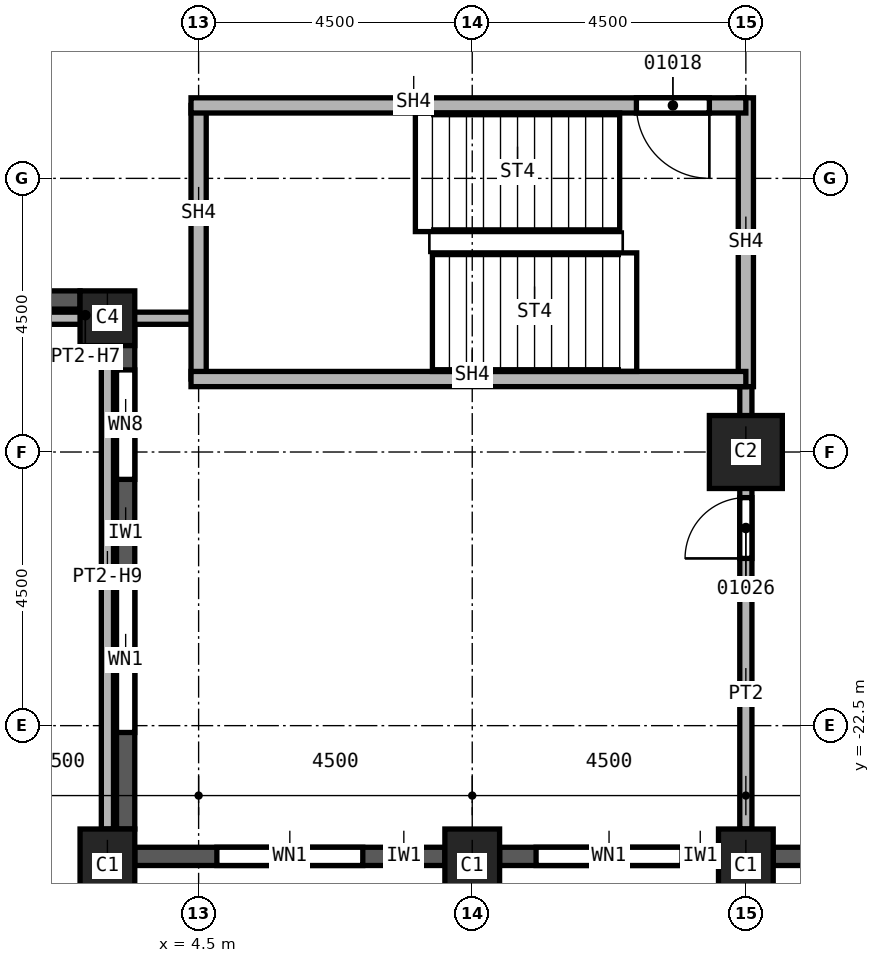
"""IFC4 building model, lengths in metres.
Left out: names, types, materials, properties, quantities, classifications, styles, units other than length and angle.
Written with IfcOpenShell. Run it as: python <this file> out.ifc"""

import sys

from ifc_helpers import new_model, si_unit, direction, frame, frame_2d, origin, origin_2d, place, context, subcontext, project, spatial, rectangle, extrude, element, fill, save


model = new_model("IFC4")
c1 = context("Model", 3, precision=1e-05, world=origin(), true_north=direction((0.0, 1.0)))
c2 = subcontext(c1, "Body", "Model", "MODEL_VIEW")
j1 = project(units=[si_unit("LENGTHUNIT", "METRE"), si_unit("PLANEANGLEUNIT", "RADIAN")], contexts=[c1])
p1 = place(None, origin())
s1 = spatial("IfcSite", under=j1, at=p1, CompositionType="ELEMENT")
p2 = place(p1, origin())
s2 = spatial("IfcBuilding", under=s1, at=p2, CompositionType="ELEMENT")
p3 = place(p2, frame((0.0, 0.0, 68.0)))
s3 = spatial("IfcBuildingStorey", under=s2, at=p3, CompositionType="ELEMENT", Elevation=68.0)
p4 = place(p3, frame((13.5, -18.0, 0.0), z_axis=(0.0, 0.0, 1.0), x_axis=(1.0, 0.0, 0.0)))
e1 = element("IfcColumn", 1, at=p4, inside=s3, PredefinedType="COLUMN", context=c2, shape_type="SweptSolid", body=[
    extrude(rectangle(XDim=1.2, YDim=1.2, at=origin_2d()), origin(), (0.0, 0.0, 1.0), 3.7),
])
for number, where, z_axis, x_axis in (
    (2, (3.0, -24.8, 0.0), (0.0, 0.0, 1.0), (1.0, 0.0, 0.0)),
    (3, (9.0, -24.8, 0.0), (0.0, 0.0, 1.0), (1.0, 0.0, 0.0)),
    (4, (13.5, -24.8, 0.0), (0.0, 0.0, 1.0), (1.0, 0.0, 0.0)),
):
    element("IfcColumn", number, at=place(p3, frame(where, z_axis=z_axis, x_axis=x_axis)), inside=s3, PredefinedType="COLUMN", context=c2, shape_type="SweptSolid", body=[
        extrude(rectangle(XDim=0.9, YDim=1.2, at=origin_2d()), origin(), (0.0, 0.0, 1.0), 3.7),
    ])
p5 = place(p3, frame((3.0, -15.8, 0.0), z_axis=(0.0, 0.0, 1.0), x_axis=(1.0, 0.0, 0.0)))
e5 = element("IfcColumn", 5, at=p5, inside=s3, PredefinedType="COLUMN", context=c2, shape_type="SweptSolid", body=[
    extrude(rectangle(XDim=0.9, YDim=0.9, at=origin_2d()), origin(), (0.0, 0.0, 1.0), 3.7),
])
p6 = place(p3, frame((2.55, -15.5, 0.0), z_axis=(0.0, 0.0, 1.0), x_axis=(-1.0, 0.0, 0.0)))
e6 = element("IfcWall", 6, at=p6, inside=s3, PredefinedType="SOLIDWALL", context=c2, shape_type="SweptSolid", body=[
    extrude(rectangle(XDim=5.1, YDim=0.3, at=frame_2d((2.55, 0.0))), origin(), (0.0, 0.0, 1.0), 3.1),
])
p7 = place(p6, frame((1.95, 0.0, 0.0)))
e7 = element("IfcOpeningElement", 7, at=p7, cuts=e6, PredefinedType="OPENING", context=c2, shape_type="SweptSolid", body=[
    extrude(rectangle(XDim=1.2, YDim=2.4, at=frame_2d((0.6, 1.2))), frame((0.0, 0.15, 0.0), z_axis=(0.0, -1.0, 0.0), x_axis=(1.0, 0.0, 0.0)), (0.0, 0.0, 1.0), 0.3),
])
p8 = place(p3, frame((3.3, -15.85, 0.0), z_axis=(0.0, 0.0, 1.0), x_axis=(0.0, -1.0, 0.0)))
e8 = element("IfcWall", 8, at=p8, inside=s3, PredefinedType="SOLIDWALL", context=c2, shape_type="SweptSolid", body=[
    extrude(rectangle(XDim=8.35, YDim=0.3, at=frame_2d((4.175, 0.0))), origin(), (0.0, 0.0, 1.0), 3.1),
])
p9 = place(p8, frame((4.363, 0.0, 0.8)))
e9 = element("IfcOpeningElement", 9, at=p9, cuts=e8, PredefinedType="OPENING", context=c2, shape_type="SweptSolid", body=[
    extrude(rectangle(XDim=2.4, YDim=1.95, at=frame_2d((1.2, 0.975))), frame((0.0, 0.15, 0.0), z_axis=(0.0, -1.0, 0.0), x_axis=(1.0, 0.0, 0.0)), (0.0, 0.0, 1.0), 0.3),
])
p10 = place(p8, frame((0.8, 0.0, 0.8)))
e10 = element("IfcOpeningElement", 10, at=p10, cuts=e8, PredefinedType="OPENING", context=c2, shape_type="SweptSolid", body=[
    extrude(rectangle(XDim=1.8, YDim=1.95, at=frame_2d((0.9, 0.975))), frame((0.0, 0.15, 0.0), z_axis=(0.0, -1.0, 0.0), x_axis=(1.0, 0.0, 0.0)), (0.0, 0.0, 1.0), 0.3),
])
p11 = place(p3, frame((3.45, -24.65, 0.0), z_axis=(0.0, 0.0, 1.0), x_axis=(1.0, 0.0, 0.0)))
e11 = element("IfcWall", 11, at=p11, inside=s3, PredefinedType="SOLIDWALL", context=c2, shape_type="SweptSolid", body=[
    extrude(rectangle(XDim=5.1, YDim=0.3, at=frame_2d((2.55, 0.0))), origin(), (0.0, 0.0, 1.0), 3.1),
])
p12 = place(p11, frame((1.35, 0.0, 0.8)))
e12 = element("IfcOpeningElement", 12, at=p12, cuts=e11, PredefinedType="OPENING", context=c2, shape_type="SweptSolid", body=[
    extrude(rectangle(XDim=2.4, YDim=1.95, at=frame_2d((1.2, 0.975))), frame((0.0, 0.15, 0.0), z_axis=(0.0, -1.0, 0.0), x_axis=(1.0, 0.0, 0.0)), (0.0, 0.0, 1.0), 0.3),
])
p13 = place(p3, frame((9.45, -24.65, 0.0), z_axis=(0.0, 0.0, 1.0), x_axis=(1.0, 0.0, 0.0)))
e13 = element("IfcWall", 13, at=p13, inside=s3, PredefinedType="SOLIDWALL", context=c2, shape_type="SweptSolid", body=[
    extrude(rectangle(XDim=3.6, YDim=0.3, at=frame_2d((1.8, 0.0))), origin(), (0.0, 0.0, 1.0), 3.1),
])
p14 = place(p13, frame((0.6, 0.0, 0.8)))
e14 = element("IfcOpeningElement", 14, at=p14, cuts=e13, PredefinedType="OPENING", context=c2, shape_type="SweptSolid", body=[
    extrude(rectangle(XDim=2.4, YDim=1.95, at=frame_2d((1.2, 0.975))), frame((0.0, 0.15, 0.0), z_axis=(0.0, -1.0, 0.0), x_axis=(1.0, 0.0, 0.0)), (0.0, 0.0, 1.0), 0.3),
])
p15 = place(p3, frame((13.95, -24.65, 0.0), z_axis=(0.0, 0.0, 1.0), x_axis=(1.0, 0.0, 0.0)))
e15 = element("IfcWall", 15, at=p15, inside=s3, PredefinedType="SOLIDWALL", context=c2, shape_type="SweptSolid", body=[
    extrude(rectangle(XDim=3.6, YDim=0.3, at=frame_2d((1.8, 0.0))), origin(), (0.0, 0.0, 1.0), 3.1),
])
p16 = place(p15, frame((0.625, 0.0, 0.8)))
e16 = element("IfcOpeningElement", 16, at=p16, cuts=e15, PredefinedType="OPENING", context=c2, shape_type="SweptSolid", body=[
    extrude(rectangle(XDim=0.6, YDim=1.95, at=frame_2d((0.3, 0.975))), frame((0.0, 0.15, 0.0), z_axis=(0.0, -1.0, 0.0), x_axis=(1.0, 0.0, 0.0)), (0.0, 0.0, 1.0), 0.3),
])
p17 = place(p15, frame((1.825, 0.0, 0.8)))
e17 = element("IfcOpeningElement", 17, at=p17, cuts=e15, PredefinedType="OPENING", context=c2, shape_type="SweptSolid", body=[
    extrude(rectangle(XDim=1.0, YDim=1.95, at=frame_2d((0.5, 0.975))), frame((0.0, 0.15, 0.0), z_axis=(0.0, -1.0, 0.0), x_axis=(1.0, 0.0, 0.0)), (0.0, 0.0, 1.0), 0.3),
])
p18 = place(p3, frame((3.0, -15.8, 0.0), z_axis=(0.0, 0.0, 1.0), x_axis=(0.0, -1.0, 0.0)))
e18 = element("IfcWall", 18, at=p18, inside=s3, PredefinedType="PARTITIONING", context=c2, shape_type="SweptSolid", body=[
    extrude(rectangle(XDim=8.4, YDim=0.2, at=frame_2d((4.2, 0.0))), origin(), (0.0, 0.0, 1.0), 2.854),
])
p19 = place(p3, frame((4.5, -15.8, 0.0), z_axis=(0.0, 0.0, 1.0), x_axis=(-1.0, 0.0, 0.0)))
e19 = element("IfcWall", 19, at=p19, inside=s3, PredefinedType="PARTITIONING", context=c2, shape_type="SweptSolid", body=[
    extrude(rectangle(XDim=3.6, YDim=0.2, at=frame_2d((1.8, 0.0))), origin(), (0.0, 0.0, 1.0), 3.083),
])
p20 = place(p3, frame((13.5, -24.2, 0.0), z_axis=(0.0, 0.0, 1.0), x_axis=(0.0, 1.0, 0.0)))
e20 = element("IfcWall", 20, at=p20, inside=s3, PredefinedType="PARTITIONING", context=c2, shape_type="SweptSolid", body=[
    extrude(rectangle(XDim=7.525, YDim=0.2, at=frame_2d((3.762, 0.0))), origin(), (0.0, 0.0, 1.0), 3.7),
])
p21 = place(p20, frame((4.45, 0.0, 0.0)))
e21 = element("IfcOpeningElement", 21, at=p21, cuts=e20, PredefinedType="OPENING", context=c2, shape_type="SweptSolid", body=[
    extrude(rectangle(XDim=1.0, YDim=2.1, at=frame_2d((0.5, 1.05))), frame((0.0, 0.1, 0.0), z_axis=(0.0, -1.0, 0.0), x_axis=(1.0, 0.0, 0.0)), (0.0, 0.0, 1.0), 0.2),
])
p22 = place(p3, frame((4.5, -16.8, 0.0), z_axis=(0.0, 0.0, 1.0), x_axis=(0.0, 1.0, 0.0)))
e22 = element("IfcWall", 22, at=p22, inside=s3, PredefinedType="SOLIDWALL", context=c2, shape_type="SweptSolid", body=[
    extrude(rectangle(XDim=4.5, YDim=0.25, at=frame_2d((2.25, 0.0))), origin(), (0.0, 0.0, 1.0), 3.7),
])
p23 = place(p3, frame((13.5, -16.925, 0.0), z_axis=(0.0, 0.0, 1.0), x_axis=(0.0, 1.0, 0.0)))
e23 = element("IfcWall", 23, at=p23, inside=s3, PredefinedType="SOLIDWALL", context=c2, shape_type="SweptSolid", body=[
    extrude(rectangle(XDim=4.75, YDim=0.25, at=frame_2d((2.375, 0.0))), origin(), (0.0, 0.0, 1.0), 3.7),
])
p24 = place(p3, frame((13.5, -16.8, 0.0), z_axis=(0.0, 0.0, 1.0), x_axis=(-1.0, 0.0, 0.0)))
e24 = element("IfcWall", 24, at=p24, inside=s3, PredefinedType="SOLIDWALL", context=c2, shape_type="SweptSolid", body=[
    extrude(rectangle(XDim=9.125, YDim=0.25, at=frame_2d((4.562, 0.0))), origin(), (0.0, 0.0, 1.0), 3.7),
])
p25 = place(p3, frame((13.5, -12.3, 0.0), z_axis=(0.0, 0.0, 1.0), x_axis=(-1.0, 0.0, 0.0)))
e25 = element("IfcWall", 25, at=p25, inside=s3, PredefinedType="SOLIDWALL", context=c2, shape_type="SweptSolid", body=[
    extrude(rectangle(XDim=9.125, YDim=0.25, at=frame_2d((4.562, 0.0))), origin(), (0.0, 0.0, 1.0), 3.7),
])
p26 = place(p25, frame((0.6, 0.0, 0.0)))
e26 = element("IfcOpeningElement", 26, at=p26, cuts=e25, PredefinedType="OPENING", context=c2, shape_type="SweptSolid", body=[
    extrude(rectangle(XDim=1.2, YDim=2.1, at=frame_2d((0.6, 1.05))), frame((0.0, 0.125, 0.0), z_axis=(0.0, -1.0, 0.0), x_axis=(1.0, 0.0, 0.0)), (0.0, 0.0, 1.0), 0.25),
])
p27 = place(p9, origin())
e27 = element("IfcWindow", 27, at=p27, inside=s3, PartitioningType="SINGLE_PANEL", PredefinedType="WINDOW", context=c2, shape_type="SweptSolid", body=[
    extrude(rectangle(XDim=2.4, YDim=1.95, at=frame_2d((1.2, 0.975))), frame((0.0, 0.03, 0.0), z_axis=(0.0, -1.0, 0.0), x_axis=(1.0, 0.0, 0.0)), (0.0, 0.0, 1.0), 0.06),
])
fill(e9, e27)
p28 = place(p12, origin())
e28 = element("IfcWindow", 28, at=p28, inside=s3, PartitioningType="SINGLE_PANEL", PredefinedType="WINDOW", context=c2, shape_type="SweptSolid", body=[
    extrude(rectangle(XDim=2.4, YDim=1.95, at=frame_2d((1.2, 0.975))), frame((0.0, 0.03, 0.0), z_axis=(0.0, -1.0, 0.0), x_axis=(1.0, 0.0, 0.0)), (0.0, 0.0, 1.0), 0.06),
])
fill(e12, e28)
p29 = place(p14, origin())
e29 = element("IfcWindow", 29, at=p29, inside=s3, PartitioningType="SINGLE_PANEL", PredefinedType="WINDOW", context=c2, shape_type="SweptSolid", body=[
    extrude(rectangle(XDim=2.4, YDim=1.95, at=frame_2d((1.2, 0.975))), frame((0.0, 0.03, 0.0), z_axis=(0.0, -1.0, 0.0), x_axis=(1.0, 0.0, 0.0)), (0.0, 0.0, 1.0), 0.06),
])
fill(e14, e29)
p30 = place(p26, origin())
e30 = element("IfcDoor", 30, at=p30, inside=s3, OperationType="SINGLE_SWING_LEFT", PredefinedType="DOOR", context=c2, shape_type="SweptSolid", body=[
    extrude(rectangle(XDim=1.2, YDim=2.1, at=frame_2d((0.6, 1.05))), frame((0.0, 0.025, 0.0), z_axis=(0.0, -1.0, 0.0), x_axis=(1.0, 0.0, 0.0)), (0.0, 0.0, 1.0), 0.05),
])
fill(e26, e30)
p31 = place(p21, origin())
e31 = element("IfcDoor", 31, at=p31, inside=s3, OperationType="SINGLE_SWING_LEFT", PredefinedType="DOOR", context=c2, shape_type="SweptSolid", body=[
    extrude(rectangle(XDim=1.0, YDim=2.1, at=frame_2d((0.5, 1.05))), frame((0.0, 0.025, 0.0), z_axis=(0.0, -1.0, 0.0), x_axis=(1.0, 0.0, 0.0)), (0.0, 0.0, 1.0), 0.05),
])
fill(e21, e31)
p32 = place(p10, origin())
e32 = element("IfcWindow", 32, at=p32, inside=s3, PartitioningType="SINGLE_PANEL", PredefinedType="WINDOW", context=c2, shape_type="SweptSolid", body=[
    extrude(rectangle(XDim=1.8, YDim=1.95, at=frame_2d((0.9, 0.975))), frame((0.0, 0.03, 0.0), z_axis=(0.0, -1.0, 0.0), x_axis=(1.0, 0.0, 0.0)), (0.0, 0.0, 1.0), 0.06),
])
fill(e10, e32)
save(model, sys.argv[1])
